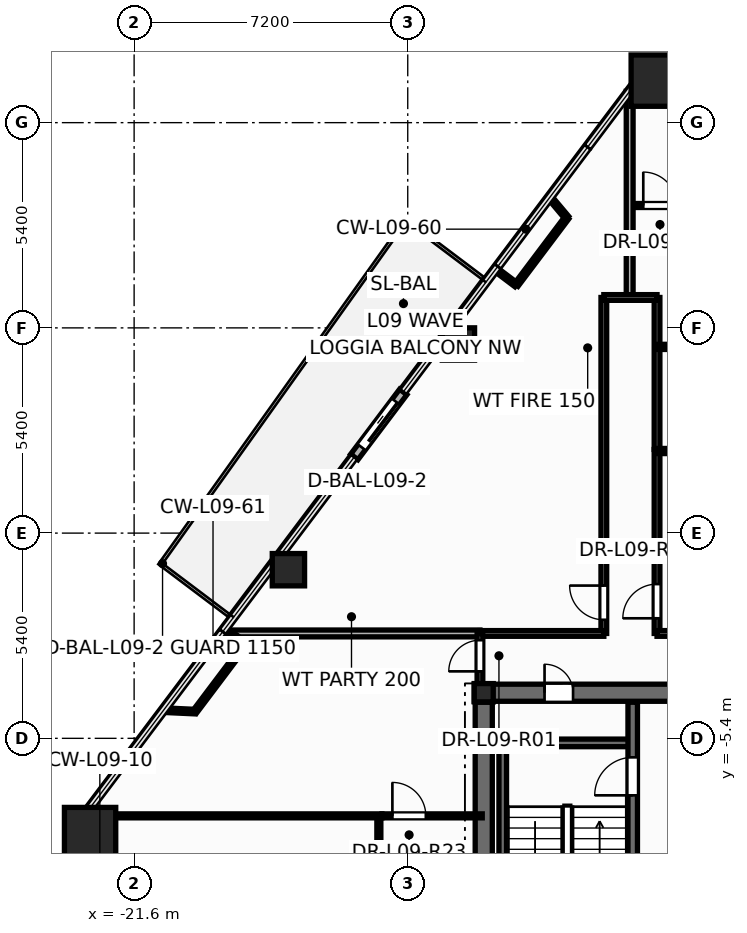
"""IFC4 building model, lengths in metres.
Left out: names, types, materials, properties, quantities, classifications, styles, units other than length and angle.
Written with IfcOpenShell. Run it as: python <this file> out.ifc"""

import sys

from ifc_helpers import new_model, si_unit, direction, frame, frame_2d, origin, origin_2d, place, context, subcontext, project, spatial, rectangle, hollow_rectangle, hollow_circle, i_section, extrude, element, fill, save


model = new_model("IFC4")
c1 = context("Model", 3, precision=1e-05, world=origin(), true_north=direction((0.0, 1.0)))
c2 = subcontext(c1, "Body", "Model", "MODEL_VIEW")
j1 = project(units=[si_unit("LENGTHUNIT", "METRE"), si_unit("PLANEANGLEUNIT", "RADIAN")], contexts=[c1])
p1 = place(None, origin())
s1 = spatial("IfcSite", under=j1, at=p1, CompositionType="ELEMENT")
p2 = place(p1, origin())
s2 = spatial("IfcBuilding", under=s1, at=p2, CompositionType="ELEMENT")
p3 = place(p2, frame((0.0, 0.0, 38.7)))
s3 = spatial("IfcBuildingStorey", under=s2, at=p3, CompositionType="ELEMENT", Elevation=38.7)
for number, where, z_axis, x_axis in (
    (1, (-22.759, -7.892, 0.0), (0.0, 0.0, 1.0), (1.0, 0.0, 0.0)),
    (2, (-7.847, 11.906, 0.0), (0.0, 0.0, 1.0), (1.0, 0.0, 0.0)),
):
    element("IfcColumn", number, at=place(p3, frame(where, z_axis=z_axis, x_axis=x_axis)), inside=s3, PredefinedType="COLUMN", context=c2, shape_type="SweptSolid", body=[
        extrude(hollow_rectangle(XDim=1.35, YDim=1.35, WallThickness=0.065, at=origin_2d()), origin(), (0.0, 0.0, 1.0), 3.6),
    ])
for number, where, z_axis, x_axis in (
    (3, (-13.066, 4.976, 0.0), (0.0, 0.0, 1.0), (1.0, 0.0, 0.0)),
    (4, (-17.54, -0.963, 0.0), (0.0, 0.0, 1.0), (1.0, 0.0, 0.0)),
):
    element("IfcColumn", number, at=place(p3, frame(where, z_axis=z_axis, x_axis=x_axis)), inside=s3, PredefinedType="COLUMN", context=c2, shape_type="SweptSolid", body=[
        extrude(hollow_circle(Radius=0.425, WallThickness=0.038, at=origin_2d()), origin(), (0.0, 0.0, 1.0), 3.6),
    ])
p4 = place(p3, frame((-12.4, -4.2, 0.0), z_axis=(0.0, 0.0, 1.0), x_axis=(1.0, 0.0, 0.0)))
e5 = element("IfcColumn", 5, at=p4, inside=s3, PredefinedType="COLUMN", context=c2, shape_type="SweptSolid", body=[
    extrude(i_section(OverallWidth=0.5, OverallDepth=0.482, WebThickness=0.04, FlangeThickness=0.045, at=origin_2d()), origin(), (0.0, 0.0, 1.0), 3.6),
])
p5 = place(p3, frame((-14.518, 3.713, -0.015), z_axis=(0.0, 0.0, 1.0), x_axis=(-0.601696267697, -0.79872498486, 0.0)))
e6 = element("IfcWall", 6, at=p5, inside=s3, PredefinedType="STANDARD", context=c2, shape_type="SweptSolid", body=[
    extrude(rectangle(XDim=2.14, YDim=0.24, at=frame_2d((1.07, 0.0))), origin(), (0.0, 0.0, 1.0), 2.728),
])
p6 = place(p5, frame((0.32, 0.0, 0.015)))
e7 = element("IfcOpeningElement", 7, at=p6, cuts=e6, PredefinedType="OPENING", context=c2, shape_type="SweptSolid", body=[
    extrude(rectangle(XDim=1.506, YDim=2.204, at=frame_2d((0.75, 1.102))), frame((0.0, 0.13, 0.0), z_axis=(0.0, -1.0, 0.0), x_axis=(1.0, 0.0, 0.0)), (0.0, 0.0, 1.0), 0.26),
])
p7 = place(p3, frame((-12.65, -4.2, 0.0), z_axis=(0.0, 0.0, 1.0), x_axis=(1.0, 0.0, 0.0)))
e8 = element("IfcWall", 8, at=p7, inside=s3, PredefinedType="SHEAR", context=c2, shape_type="SweptSolid", body=[
    extrude(rectangle(XDim=25.3, YDim=0.45, at=frame_2d((12.65, 0.0))), origin(), (0.0, 0.0, 1.0), 3.6),
])
p8 = place(p7, frame((1.85, 0.0, 0.0)))
e9 = element("IfcOpeningElement", 9, at=p8, cuts=e8, PredefinedType="OPENING", context=c2, shape_type="SweptSolid", body=[
    extrude(rectangle(XDim=0.756, YDim=2.054, at=frame_2d((0.375, 1.027))), frame((0.0, 0.235, 0.0), z_axis=(0.0, -1.0, 0.0), x_axis=(1.0, 0.0, 0.0)), (0.0, 0.0, 1.0), 0.47),
])
p9 = place(p7, frame((22.65, 0.0, 0.0)))
e10 = element("IfcOpeningElement", 10, at=p9, cuts=e8, PredefinedType="OPENING", context=c2, shape_type="SweptSolid", body=[
    extrude(rectangle(XDim=0.756, YDim=2.054, at=frame_2d((0.375, 1.027))), frame((0.0, 0.235, 0.0), z_axis=(0.0, -1.0, 0.0), x_axis=(1.0, 0.0, 0.0)), (0.0, 0.0, 1.0), 0.47),
])
p10 = place(p7, frame((5.85, 0.0, 0.0)))
e11 = element("IfcOpeningElement", 11, at=p10, cuts=e8, PredefinedType="OPENING", context=c2, shape_type="SweptSolid", body=[
    extrude(rectangle(XDim=1.006, YDim=2.104, at=frame_2d((0.5, 1.052))), frame((0.0, 0.235, 0.0), z_axis=(0.0, -1.0, 0.0), x_axis=(1.0, 0.0, 0.0)), (0.0, 0.0, 1.0), 0.47),
])
p11 = place(p7, frame((10.35, 0.0, 0.0)))
e12 = element("IfcOpeningElement", 12, at=p11, cuts=e8, PredefinedType="OPENING", context=c2, shape_type="SweptSolid", body=[
    extrude(rectangle(XDim=1.406, YDim=2.154, at=frame_2d((0.7, 1.077))), frame((0.0, 0.235, 0.0), z_axis=(0.0, -1.0, 0.0), x_axis=(1.0, 0.0, 0.0)), (0.0, 0.0, 1.0), 0.47),
])
p12 = place(p7, frame((18.45, 0.0, 0.0)))
e13 = element("IfcOpeningElement", 13, at=p12, cuts=e8, PredefinedType="OPENING", context=c2, shape_type="SweptSolid", body=[
    extrude(rectangle(XDim=1.006, YDim=2.104, at=frame_2d((0.5, 1.052))), frame((0.0, 0.235, 0.0), z_axis=(0.0, -1.0, 0.0), x_axis=(1.0, 0.0, 0.0)), (0.0, 0.0, 1.0), 0.47),
])
p13 = place(p3, frame((-12.35, -5.52, 0.0), z_axis=(0.0, 0.0, 1.0), x_axis=(1.0, 0.0, 0.0)))
e14 = element("IfcWall", 14, at=p13, inside=s3, PredefinedType="SOLIDWALL", context=c2, shape_type="SweptSolid", body=[
    extrude(rectangle(XDim=3.87, YDim=0.2, at=frame_2d((1.935, 0.0))), origin(), (0.0, 0.0, 1.0), 3.6),
])
p14 = place(p3, frame((-11.9, -13.1, 0.0), z_axis=(0.0, 0.0, 1.0), x_axis=(0.0, 1.0, 0.0)))
e15 = element("IfcWall", 15, at=p14, inside=s3, PredefinedType="SOLIDWALL", context=c2, shape_type="SweptSolid", body=[
    extrude(rectangle(XDim=7.58, YDim=0.2, at=frame_2d((3.79, 0.0))), origin(), (0.0, 0.0, 1.0), 3.6),
])
p15 = place(p3, frame((-8.48, -13.85, 0.0), z_axis=(0.0, 0.0, 1.0), x_axis=(0.0, 1.0, 0.0)))
e16 = element("IfcWall", 16, at=p15, inside=s3, PredefinedType="SHEAR", context=c2, shape_type="SweptSolid", body=[
    extrude(rectangle(XDim=9.4, YDim=0.25, at=frame_2d((4.7, 0.0))), origin(), (0.0, 0.0, 1.0), 3.6),
])
p16 = place(p15, frame((6.95, 0.0, 0.0)))
e17 = element("IfcOpeningElement", 17, at=p16, cuts=e16, PredefinedType="OPENING", context=c2, shape_type="SweptSolid", body=[
    extrude(rectangle(XDim=1.006, YDim=2.104, at=frame_2d((0.5, 1.052))), frame((0.0, 0.135, 0.0), z_axis=(0.0, -1.0, 0.0), x_axis=(1.0, 0.0, 0.0)), (0.0, 0.0, 1.0), 0.27),
])
p17 = place(p3, frame((-12.4, -13.85, 0.0), z_axis=(0.0, 0.0, 1.0), x_axis=(0.0, 1.0, 0.0)))
e18 = element("IfcWall", 18, at=p17, inside=s3, PredefinedType="SHEAR", context=c2, shape_type="SweptSolid", body=[
    extrude(rectangle(XDim=9.4, YDim=0.45, at=frame_2d((4.7, 0.0))), origin(), (0.0, 0.0, 1.0), 3.6),
])
p18 = place(p3, frame((-9.24, -2.64, 0.0), z_axis=(0.0, 0.0, 1.0), x_axis=(0.0, 1.0, 0.0)))
e19 = element("IfcWall", 19, at=p18, inside=s3, PredefinedType="PARTITIONING", context=c2, shape_type="SweptSolid", body=[
    extrude(rectangle(XDim=8.84, YDim=0.15, at=frame_2d((4.42, 0.0))), origin(), (0.0, 0.0, 1.0), 2.509),
])
p19 = place(p18, frame((0.359, 0.0, 0.0)))
e20 = element("IfcOpeningElement", 20, at=p19, cuts=e19, PredefinedType="OPENING", context=c2, shape_type="SweptSolid", body=[
    extrude(rectangle(XDim=0.906, YDim=2.104, at=frame_2d((0.45, 1.052))), frame((0.0, 0.085, 0.0), z_axis=(0.0, -1.0, 0.0), x_axis=(1.0, 0.0, 0.0)), (0.0, 0.0, 1.0), 0.17),
])
p20 = place(p3, frame((-22.919, -7.44, 0.0), z_axis=(0.0, 0.0, 1.0), x_axis=(1.0, 0.0, 0.0)))
e21 = element("IfcWall", 21, at=p20, inside=s3, PredefinedType="PARTITIONING", context=c2, shape_type="SweptSolid", body=[
    extrude(rectangle(XDim=7.839, YDim=0.105, at=frame_2d((3.919, 0.0))), origin(), (0.0, 0.0, 1.0), 2.325),
])
p21 = place(p3, frame((-19.26, -2.64, 0.0), z_axis=(0.0, 0.0, 1.0), x_axis=(1.0, 0.0, 0.0)))
e22 = element("IfcWall", 22, at=p21, inside=s3, PredefinedType="PARTITIONING", context=c2, shape_type="SweptSolid", body=[
    extrude(rectangle(XDim=6.76, YDim=0.18, at=frame_2d((3.38, 0.0))), origin(), (0.0, 0.0, 1.0), 2.713),
])
p22 = place(p3, frame((-15.16, -13.06, 0.0), z_axis=(0.0, 0.0, 1.0), x_axis=(0.0, 1.0, 0.0)))
e23 = element("IfcWall", 23, at=p22, inside=s3, PredefinedType="PARTITIONING", context=c2, shape_type="SweptSolid", body=[
    extrude(rectangle(XDim=5.62, YDim=0.105, at=frame_2d((2.81, 0.0))), origin(), (0.0, 0.0, 1.0), 3.35),
])
p23 = place(p22, frame((0.399, 0.0, 0.0)))
e24 = element("IfcOpeningElement", 24, at=p23, cuts=e23, PredefinedType="OPENING", context=c2, shape_type="SweptSolid", body=[
    extrude(rectangle(XDim=0.886, YDim=2.104, at=frame_2d((0.44, 1.052))), frame((0.0, 0.062, 0.0), z_axis=(0.0, -1.0, 0.0), x_axis=(1.0, 0.0, 0.0)), (0.0, 0.0, 1.0), 0.125),
])
p24 = place(p3, frame((-8.56, 8.62, 0.0), z_axis=(0.0, 0.0, 1.0), x_axis=(1.0, 0.0, 0.0)))
e25 = element("IfcWall", 25, at=p24, inside=s3, PredefinedType="PARTITIONING", context=c2, shape_type="SweptSolid", body=[
    extrude(rectangle(XDim=5.36, YDim=0.105, at=frame_2d((2.68, 0.0))), origin(), (0.0, 0.0, 1.0), 2.509),
])
p25 = place(p24, frame((0.358, 0.0, 0.0)))
e26 = element("IfcOpeningElement", 26, at=p25, cuts=e25, PredefinedType="OPENING", context=c2, shape_type="SweptSolid", body=[
    extrude(rectangle(XDim=0.886, YDim=2.104, at=frame_2d((0.44, 1.052))), frame((0.0, 0.062, 0.0), z_axis=(0.0, -1.0, 0.0), x_axis=(1.0, 0.0, 0.0)), (0.0, 0.0, 1.0), 0.125),
])
p26 = place(p3, frame((-7.84, -2.64, 0.0), z_axis=(0.0, 0.0, 1.0), x_axis=(0.0, 1.0, 0.0)))
e27 = element("IfcWall", 27, at=p26, inside=s3, PredefinedType="PARTITIONING", context=c2, shape_type="SweptSolid", body=[
    extrude(rectangle(XDim=4.84, YDim=0.15, at=frame_2d((2.42, 0.0))), origin(), (0.0, 0.0, 1.0), 2.509),
])
p27 = place(p26, frame((0.398, 0.0, 0.0)))
e28 = element("IfcOpeningElement", 28, at=p27, cuts=e27, PredefinedType="OPENING", context=c2, shape_type="SweptSolid", body=[
    extrude(rectangle(XDim=0.906, YDim=2.104, at=frame_2d((0.45, 1.052))), frame((0.0, 0.085, 0.0), z_axis=(0.0, -1.0, 0.0), x_axis=(1.0, 0.0, 0.0)), (0.0, 0.0, 1.0), 0.17),
])
p28 = place(p3, frame((-7.84, -2.64, 0.0), z_axis=(0.0, 0.0, 1.0), x_axis=(1.0, 0.0, 0.0)))
e29 = element("IfcWall", 29, at=p28, inside=s3, PredefinedType="PARTITIONING", context=c2, shape_type="SweptSolid", body=[
    extrude(rectangle(XDim=7.0, YDim=0.15, at=frame_2d((3.5, 0.0))), origin(), (0.0, 0.0, 1.0), 2.325),
])
p29 = place(p3, frame((-12.5, -2.64, 0.0), z_axis=(0.0, 0.0, 1.0), x_axis=(1.0, 0.0, 0.0)))
e30 = element("IfcWall", 30, at=p29, inside=s3, PredefinedType="PARTITIONING", context=c2, shape_type="SweptSolid", body=[
    extrude(rectangle(XDim=3.26, YDim=0.15, at=frame_2d((1.63, 0.0))), origin(), (0.0, 0.0, 1.0), 3.35),
])
p30 = place(p3, frame((-8.56, 6.2, 0.0), z_axis=(0.0, 0.0, 1.0), x_axis=(0.0, 1.0, 0.0)))
e31 = element("IfcWall", 31, at=p30, inside=s3, PredefinedType="PARTITIONING", context=c2, shape_type="SweptSolid", body=[
    extrude(rectangle(XDim=5.425, YDim=0.18, at=frame_2d((2.712, 0.0))), origin(), (0.0, 0.0, 1.0), 2.509),
])
p31 = place(p3, frame((-7.84, 2.202, 0.0), z_axis=(0.0, 0.0, 1.0), x_axis=(0.0, 1.0, 0.0)))
e32 = element("IfcWall", 32, at=p31, inside=s3, PredefinedType="PARTITIONING", context=c2, shape_type="SweptSolid", body=[
    extrude(rectangle(XDim=3.998, YDim=0.15, at=frame_2d((1.999, 0.0))), origin(), (0.0, 0.0, 1.0), 2.509),
])
p32 = place(p3, frame((-15.078, -7.44, 0.0), z_axis=(0.0, 0.0, 1.0), x_axis=(1.0, 0.0, 0.0)))
e33 = element("IfcWall", 33, at=p32, inside=s3, PredefinedType="PARTITIONING", context=c2, shape_type="SweptSolid", body=[
    extrude(rectangle(XDim=2.638, YDim=0.105, at=frame_2d((1.319, 0.0))), origin(), (0.0, 0.0, 1.0), 2.713),
])
p33 = place(p32, frame((0.274, 0.0, 0.0)))
e34 = element("IfcOpeningElement", 34, at=p33, cuts=e33, PredefinedType="OPENING", context=c2, shape_type="SweptSolid", body=[
    extrude(rectangle(XDim=0.886, YDim=2.104, at=frame_2d((0.44, 1.052))), frame((0.0, 0.062, 0.0), z_axis=(0.0, -1.0, 0.0), x_axis=(1.0, 0.0, 0.0)), (0.0, 0.0, 1.0), 0.125),
])
p34 = place(p3, frame((-18.669, -2.928, 0.0), z_axis=(0.0, 0.0, 1.0), x_axis=(-0.601727904202, -0.798701151436, 0.0)))
e35 = element("IfcWall", 35, at=p34, inside=s3, PredefinedType="PARTITIONING", context=c2, shape_type="SweptSolid", body=[
    extrude(rectangle(XDim=2.214, YDim=0.12, at=frame_2d((1.107, 0.0))), origin(), (0.0, 0.0, 1.0), 3.35),
])
p35 = place(p3, frame((-10.213, 8.3, 0.0), z_axis=(0.0, 0.0, 1.0), x_axis=(-0.60167490335, -0.798741078622, 0.0)))
e36 = element("IfcWall", 36, at=p35, inside=s3, PredefinedType="PARTITIONING", context=c2, shape_type="SweptSolid", body=[
    extrude(rectangle(XDim=2.214, YDim=0.12, at=frame_2d((1.107, 0.0))), origin(), (0.0, 0.0, 1.0), 3.35),
])
p36 = place(p3, frame((-12.5, -4.24, 0.0), z_axis=(0.0, 0.0, 1.0), x_axis=(0.0, 1.0, 0.0)))
e37 = element("IfcWall", 37, at=p36, inside=s3, PredefinedType="PARTITIONING", context=c2, shape_type="SweptSolid", body=[
    extrude(rectangle(XDim=1.6, YDim=0.15, at=frame_2d((0.8, 0.0))), origin(), (0.0, 0.0, 1.0), 2.325),
])
p37 = place(p36, frame((0.602, 0.0, 0.0)))
e38 = element("IfcOpeningElement", 38, at=p37, cuts=e37, PredefinedType="OPENING", context=c2, shape_type="SweptSolid", body=[
    extrude(rectangle(XDim=0.826, YDim=2.104, at=frame_2d((0.41, 1.052))), frame((0.0, 0.085, 0.0), z_axis=(0.0, -1.0, 0.0), x_axis=(1.0, 0.0, 0.0)), (0.0, 0.0, 1.0), 0.17),
])
p38 = place(p3, frame((-7.84, 2.16, 0.0), z_axis=(0.0, 0.0, 1.0), x_axis=(1.0, 0.0, 0.0)))
e39 = element("IfcWall", 39, at=p38, inside=s3, PredefinedType="PARTITIONING", context=c2, shape_type="SweptSolid", body=[
    extrude(rectangle(XDim=1.478, YDim=0.135, at=frame_2d((0.739, 0.0))), origin(), (0.0, 0.0, 1.0), 2.325),
])
p39 = place(p3, frame((-7.84, 4.9, 0.0), z_axis=(0.0, 0.0, 1.0), x_axis=(1.0, 0.0, 0.0)))
e40 = element("IfcWall", 40, at=p39, inside=s3, PredefinedType="PARTITIONING", context=c2, shape_type="SweptSolid", body=[
    extrude(rectangle(XDim=1.54, YDim=0.135, at=frame_2d((0.77, 0.0))), origin(), (0.0, 0.0, 1.0), 2.509),
])
p40 = place(p3, frame((-20.001, -4.697, 0.0), z_axis=(0.0, 0.0, 1.0), x_axis=(-0.99892592368, 0.046335720556, 0.0)))
e41 = element("IfcWall", 41, at=p40, inside=s3, PredefinedType="PARTITIONING", context=c2, shape_type="SweptSolid", body=[
    extrude(rectangle(XDim=0.812, YDim=0.12, at=frame_2d((0.406, 0.0))), origin(), (0.0, 0.0, 1.0), 2.713),
])
p41 = place(p3, frame((-9.24, 6.2, 0.0), z_axis=(0.0, 0.0, 1.0), x_axis=(1.0, 0.0, 0.0)))
e42 = element("IfcWall", 42, at=p41, inside=s3, PredefinedType="PARTITIONING", context=c2, shape_type="SweptSolid", body=[
    extrude(rectangle(XDim=1.4, YDim=0.15, at=frame_2d((0.7, 0.0))), origin(), (0.0, 0.0, 1.0), 3.35),
])
p42 = place(p3, frame((-10.655, 8.826, 0.0), z_axis=(0.0, 0.0, 1.0), x_axis=(0.643391917875, -0.765536961886, 0.0)))
e43 = element("IfcWall", 43, at=p42, inside=s3, PredefinedType="PARTITIONING", context=c2, shape_type="SweptSolid", body=[
    extrude(rectangle(XDim=0.688, YDim=0.12, at=frame_2d((0.344, 0.0))), origin(), (0.0, 0.0, 1.0), 2.713),
])
p43 = place(p3, frame((-19.205, -2.525, 0.0), z_axis=(0.0, 0.0, 1.0), x_axis=(0.798598820081, -0.601863709294, 0.0)))
e44 = element("IfcWall", 44, at=p43, inside=s3, PredefinedType="PARTITIONING", context=c2, shape_type="SweptSolid", body=[
    extrude(rectangle(XDim=0.67, YDim=0.12, at=frame_2d((0.335, 0.0))), origin(), (0.0, 0.0, 1.0), 2.713),
])
p44 = place(p3, frame((-11.545, 6.531, 0.0), z_axis=(0.0, 0.0, 1.0), x_axis=(-0.798773936271, 0.601631281379, 0.0)))
e45 = element("IfcWall", 45, at=p44, inside=s3, PredefinedType="PARTITIONING", context=c2, shape_type="SweptSolid", body=[
    extrude(rectangle(XDim=0.67, YDim=0.12, at=frame_2d((0.335, 0.0))), origin(), (0.0, 0.0, 1.0), 2.713),
])
p45 = place(p6, origin())
e46 = element("IfcDoor", 46, at=p45, inside=s3, OperationType="SLIDING_TO_RIGHT", PredefinedType="DOOR", context=c2, shape_type="SweptSolid", body=[
    extrude(rectangle(XDim=1.5, YDim=2.2, at=frame_2d((0.75, 1.1))), frame((0.0, 0.025, 0.0), z_axis=(0.0, -1.0, 0.0), x_axis=(1.0, 0.0, 0.0)), (0.0, 0.0, 1.0), 0.05),
])
fill(e7, e46)
p46 = place(p16, origin())
e47 = element("IfcDoor", 47, at=p46, inside=s3, OperationType="SINGLE_SWING_LEFT", PredefinedType="DOOR", context=c2, shape_type="SweptSolid", body=[
    extrude(rectangle(XDim=1.0, YDim=2.1, at=frame_2d((0.5, 1.05))), frame((0.0, 0.025, 0.0), z_axis=(0.0, -1.0, 0.0), x_axis=(1.0, 0.0, 0.0)), (0.0, 0.0, 1.0), 0.05),
])
fill(e17, e47)
p47 = place(p8, origin())
e48 = element("IfcDoor", 48, at=p47, inside=s3, OperationType="SINGLE_SWING_LEFT", PredefinedType="DOOR", context=c2, shape_type="SweptSolid", body=[
    extrude(rectangle(XDim=0.75, YDim=2.05, at=frame_2d((0.375, 1.025))), frame((0.0, 0.025, 0.0), z_axis=(0.0, -1.0, 0.0), x_axis=(1.0, 0.0, 0.0)), (0.0, 0.0, 1.0), 0.05),
])
fill(e9, e48)
p48 = place(p37, origin())
e49 = element("IfcDoor", 49, at=p48, inside=s3, OperationType="SINGLE_SWING_LEFT", PredefinedType="DOOR", context=c2, shape_type="SweptSolid", body=[
    extrude(rectangle(XDim=0.82, YDim=2.1, at=frame_2d((0.41, 1.05))), frame((0.0, 0.025, 0.0), z_axis=(0.0, -1.0, 0.0), x_axis=(1.0, 0.0, 0.0)), (0.0, 0.0, 1.0), 0.05),
])
fill(e38, e49)
p49 = place(p19, origin())
e50 = element("IfcDoor", 50, at=p49, inside=s3, OperationType="SINGLE_SWING_RIGHT", PredefinedType="DOOR", context=c2, shape_type="SweptSolid", body=[
    extrude(rectangle(XDim=0.9, YDim=2.1, at=frame_2d((0.45, 1.05))), frame((0.0, 0.025, 0.0), z_axis=(0.0, -1.0, 0.0), x_axis=(1.0, 0.0, 0.0)), (0.0, 0.0, 1.0), 0.05),
])
fill(e20, e50)
p50 = place(p27, origin())
e51 = element("IfcDoor", 51, at=p50, inside=s3, OperationType="SINGLE_SWING_LEFT", PredefinedType="DOOR", context=c2, shape_type="SweptSolid", body=[
    extrude(rectangle(XDim=0.9, YDim=2.1, at=frame_2d((0.45, 1.05))), frame((0.0, 0.025, 0.0), z_axis=(0.0, -1.0, 0.0), x_axis=(1.0, 0.0, 0.0)), (0.0, 0.0, 1.0), 0.05),
])
fill(e28, e51)
p51 = place(p25, origin())
e52 = element("IfcDoor", 52, at=p51, inside=s3, OperationType="SINGLE_SWING_LEFT", PredefinedType="DOOR", context=c2, shape_type="SweptSolid", body=[
    extrude(rectangle(XDim=0.88, YDim=2.1, at=frame_2d((0.44, 1.05))), frame((0.0, 0.025, 0.0), z_axis=(0.0, -1.0, 0.0), x_axis=(1.0, 0.0, 0.0)), (0.0, 0.0, 1.0), 0.05),
])
fill(e26, e52)
p52 = place(p33, origin())
e53 = element("IfcDoor", 53, at=p52, inside=s3, OperationType="SINGLE_SWING_LEFT", PredefinedType="DOOR", context=c2, shape_type="SweptSolid", body=[
    extrude(rectangle(XDim=0.88, YDim=2.1, at=frame_2d((0.44, 1.05))), frame((0.0, 0.025, 0.0), z_axis=(0.0, -1.0, 0.0), x_axis=(1.0, 0.0, 0.0)), (0.0, 0.0, 1.0), 0.05),
])
fill(e34, e53)
save(model, sys.argv[1])
